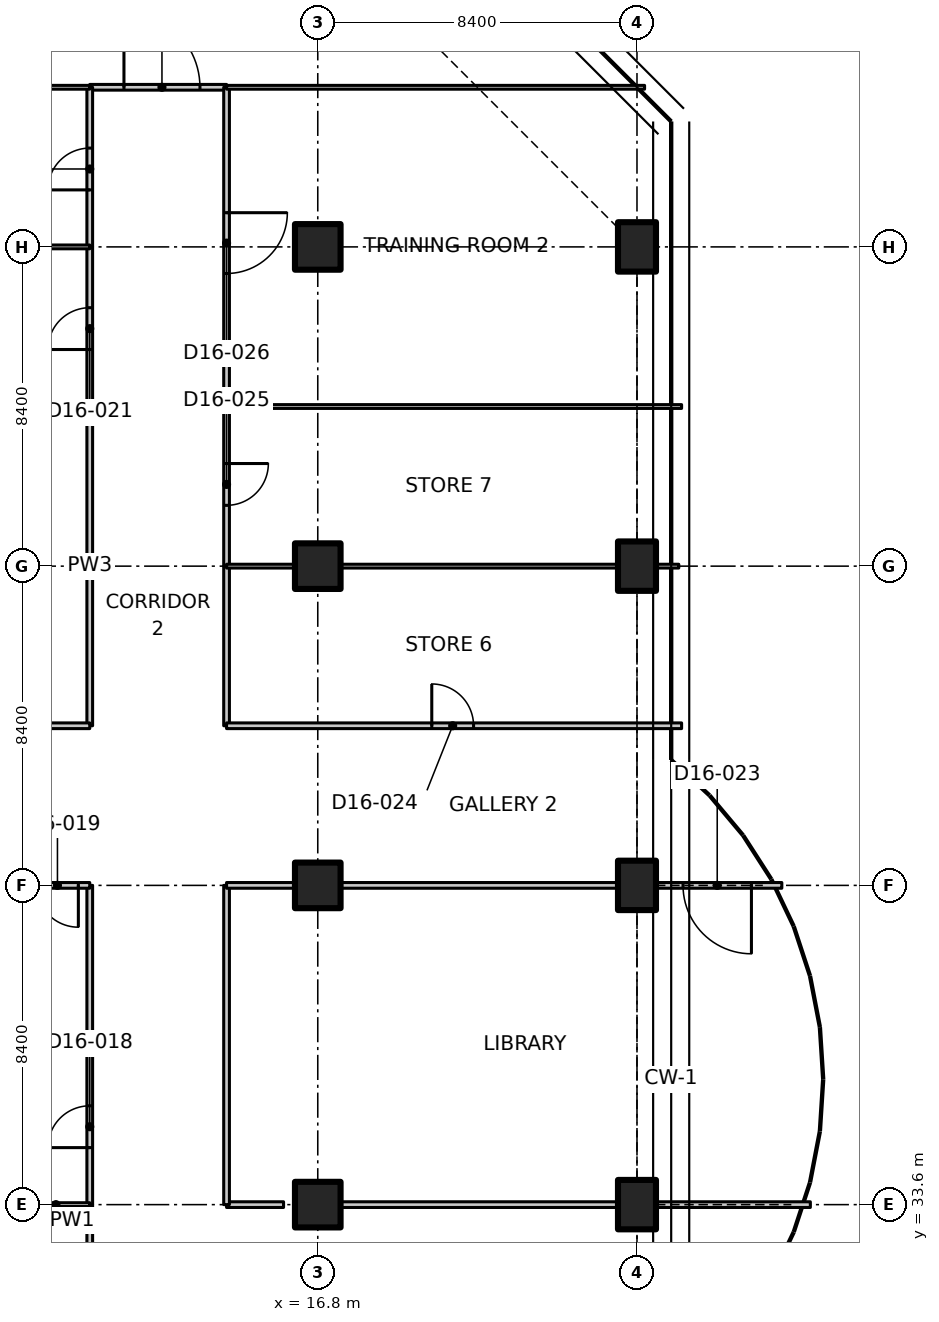
"""IFC4 building model, lengths in metres.
Left out: names, types, materials, properties, quantities, classifications, styles, units other than length and angle.
Written with IfcOpenShell. Run it as: python <this file> out.ifc"""

import sys

from ifc_helpers import new_model, si_unit, direction, frame, frame_2d, origin, origin_2d, place, context, subcontext, project, spatial, polyline, rectangle, outline, extrude, element, fill, save


model = new_model("IFC4")
c1 = context("Model", 3, precision=1e-05, world=origin(), true_north=direction((0.0, 1.0)))
c2 = subcontext(c1, "Body", "Model", "MODEL_VIEW")
j1 = project(units=[si_unit("LENGTHUNIT", "METRE"), si_unit("PLANEANGLEUNIT", "RADIAN")], contexts=[c1])
p1 = place(None, origin())
s1 = spatial("IfcSite", under=j1, at=p1, CompositionType="ELEMENT")
p2 = place(p1, origin())
s2 = spatial("IfcBuilding", under=s1, at=p2, CompositionType="ELEMENT")
p3 = place(p2, frame((0.0, 0.0, 124.1)))
s3 = spatial("IfcBuildingStorey", under=s2, at=p3, CompositionType="ELEMENT", Elevation=124.1)
for number, where, z_axis, x_axis in (
    (1, (16.8, 33.6, 0.0), (0.0, 0.0, 1.0), (1.0, 0.0, 0.0)),
    (2, (16.8, 42.0, 0.0), (0.0, 0.0, 1.0), (1.0, 0.0, 0.0)),
    (3, (16.8, 50.4, 0.0), (0.0, 0.0, 1.0), (1.0, 0.0, 0.0)),
    (4, (16.8, 58.8, 0.0), (0.0, 0.0, 1.0), (1.0, 0.0, 0.0)),
):
    element("IfcColumn", number, at=place(p3, frame(where, z_axis=z_axis, x_axis=x_axis)), inside=s3, PredefinedType="COLUMN", context=c2, shape_type="SweptSolid", body=[
        extrude(rectangle(XDim=1.2, YDim=1.2, at=origin_2d()), origin(), (0.0, 0.0, 1.0), 3.35),
    ])
for number, where, z_axis, x_axis in (
    (5, (25.2, 33.6, 0.0), (0.0, 0.0, 1.0), (1.0, 0.0, 0.0)),
    (6, (25.2, 42.0, 0.0), (0.0, 0.0, 1.0), (1.0, 0.0, 0.0)),
    (7, (25.2, 50.4, 0.0), (0.0, 0.0, 1.0), (1.0, 0.0, 0.0)),
    (8, (25.2, 58.8, 0.0), (0.0, 0.0, 1.0), (1.0, 0.0, 0.0)),
):
    element("IfcColumn", number, at=place(p3, frame(where, z_axis=z_axis, x_axis=x_axis)), inside=s3, PredefinedType="COLUMN", context=c2, shape_type="SweptSolid", body=[
        extrude(rectangle(XDim=1.0, YDim=1.3, at=origin_2d()), origin(), (0.0, 0.0, 1.0), 3.35),
    ])
p4 = place(p3, frame((10.8, 25.2, 0.0), z_axis=(0.0, 0.0, 1.0), x_axis=(0.0, 1.0, 0.0)))
e9 = element("IfcWall", 9, at=p4, inside=s3, PredefinedType="PARTITIONING", context=c2, shape_type="SweptSolid", body=[
    extrude(rectangle(XDim=8.4, YDim=0.15, at=frame_2d((4.2, 0.0))), origin(), (0.0, 0.0, 1.0), 3.33),
])
p5 = place(p4, frame((3.3, 0.0, 0.0)))
e10 = element("IfcOpeningElement", 10, at=p5, cuts=e9, PredefinedType="OPENING", context=c2, shape_type="SweptSolid", body=[
    extrude(rectangle(XDim=1.6, YDim=2.1, at=frame_2d((0.8, 1.05))), frame((0.0, 0.085, 0.0), z_axis=(0.0, -1.0, 0.0), x_axis=(1.0, 0.0, 0.0)), (0.0, 0.0, 1.0), 0.17),
])
p6 = place(p3, frame((14.4, 33.6, 0.0), z_axis=(0.0, 0.0, 1.0), x_axis=(1.0, 0.0, 0.0)))
e11 = element("IfcWall", 11, at=p6, inside=s3, PredefinedType="PARTITIONING", context=c2, shape_type="SweptSolid", body=[
    extrude(rectangle(XDim=1.5, YDim=0.15, at=frame_2d((0.75, 0.0))), origin(), (0.0, 0.0, 1.0), 3.33),
])
p7 = place(p3, frame((17.42, 33.6, 0.0), z_axis=(0.0, 0.0, 1.0), x_axis=(1.0, 0.0, 0.0)))
e12 = element("IfcWall", 12, at=p7, inside=s3, PredefinedType="PARTITIONING", context=c2, shape_type="SweptSolid", body=[
    extrude(rectangle(XDim=7.26, YDim=0.15, at=frame_2d((3.63, 0.0))), origin(), (0.0, 0.0, 1.0), 3.33),
])
p8 = place(p3, frame((25.72, 33.6, 0.0), z_axis=(0.0, 0.0, 1.0), x_axis=(1.0, 0.0, 0.0)))
e13 = element("IfcWall", 13, at=p8, inside=s3, PredefinedType="PARTITIONING", context=c2, shape_type="SweptSolid", body=[
    extrude(rectangle(XDim=4.042, YDim=0.15, at=frame_2d((2.021, 0.0))), origin(), (0.0, 0.0, 1.0), 2.98),
])
p9 = place(p3, frame((10.8, 63.0, 0.0), z_axis=(0.0, 0.0, 1.0), x_axis=(1.0, 0.0, 0.0)))
e14 = element("IfcWall", 14, at=p9, inside=s3, PredefinedType="PARTITIONING", context=c2, shape_type="SweptSolid", body=[
    extrude(rectangle(XDim=3.6, YDim=0.15, at=frame_2d((1.8, 0.0))), origin(), (0.0, 0.0, 1.0), 3.33),
])
p10 = place(p9, frame((0.9, 0.0, 0.0)))
e15 = element("IfcOpeningElement", 15, at=p10, cuts=e14, PredefinedType="OPENING", context=c2, shape_type="SweptSolid", body=[
    extrude(rectangle(XDim=2.0, YDim=2.4, at=frame_2d((1.0, 1.2))), frame((0.0, 0.085, 0.0), z_axis=(0.0, -1.0, 0.0), x_axis=(1.0, 0.0, 0.0)), (0.0, 0.0, 1.0), 0.17),
])
p11 = place(p3, frame((10.8, 33.6, 0.0), z_axis=(0.0, 0.0, 1.0), x_axis=(0.0, 1.0, 0.0)))
e16 = element("IfcWall", 16, at=p11, inside=s3, PredefinedType="PARTITIONING", context=c2, shape_type="SweptSolid", body=[
    extrude(rectangle(XDim=4.2, YDim=0.15, at=frame_2d((2.1, 0.0))), origin(), (0.0, 0.0, 1.0), 3.33),
])
p12 = place(p11, frame((1.5, 0.0, 0.0)))
e17 = element("IfcOpeningElement", 17, at=p12, cuts=e16, PredefinedType="OPENING", context=c2, shape_type="SweptSolid", body=[
    extrude(rectangle(XDim=1.1, YDim=2.1, at=frame_2d((0.55, 1.05))), frame((0.0, 0.085, 0.0), z_axis=(0.0, -1.0, 0.0), x_axis=(1.0, 0.0, 0.0)), (0.0, 0.0, 1.0), 0.17),
])
p13 = place(p3, frame((10.8, 37.8, 0.0), z_axis=(0.0, 0.0, 1.0), x_axis=(0.0, 1.0, 0.0)))
e18 = element("IfcWall", 18, at=p13, inside=s3, PredefinedType="PARTITIONING", context=c2, shape_type="SweptSolid", body=[
    extrude(rectangle(XDim=4.2, YDim=0.15, at=frame_2d((2.1, 0.0))), origin(), (0.0, 0.0, 1.0), 3.33),
])
p14 = place(p3, frame((10.8, 46.2, 0.0), z_axis=(0.0, 0.0, 1.0), x_axis=(0.0, 1.0, 0.0)))
e19 = element("IfcWall", 19, at=p14, inside=s3, PredefinedType="PARTITIONING", context=c2, shape_type="SweptSolid", body=[
    extrude(rectangle(XDim=8.4, YDim=0.15, at=frame_2d((4.2, 0.0))), origin(), (0.0, 0.0, 1.0), 3.33),
])
p15 = place(p3, frame((10.8, 54.6, 0.0), z_axis=(0.0, 0.0, 1.0), x_axis=(0.0, 1.0, 0.0)))
e20 = element("IfcWall", 20, at=p15, inside=s3, PredefinedType="PARTITIONING", context=c2, shape_type="SweptSolid", body=[
    extrude(rectangle(XDim=4.2, YDim=0.15, at=frame_2d((2.1, 0.0))), origin(), (0.0, 0.0, 1.0), 3.33),
])
p16 = place(p15, frame((1.5, 0.0, 0.0)))
e21 = element("IfcOpeningElement", 21, at=p16, cuts=e20, PredefinedType="OPENING", context=c2, shape_type="SweptSolid", body=[
    extrude(rectangle(XDim=1.1, YDim=2.1, at=frame_2d((0.55, 1.05))), frame((0.0, 0.085, 0.0), z_axis=(0.0, -1.0, 0.0), x_axis=(1.0, 0.0, 0.0)), (0.0, 0.0, 1.0), 0.17),
])
p17 = place(p3, frame((10.8, 58.8, 0.0), z_axis=(0.0, 0.0, 1.0), x_axis=(0.0, 1.0, 0.0)))
e22 = element("IfcWall", 22, at=p17, inside=s3, PredefinedType="PARTITIONING", context=c2, shape_type="SweptSolid", body=[
    extrude(rectangle(XDim=4.2, YDim=0.15, at=frame_2d((2.1, 0.0))), origin(), (0.0, 0.0, 1.0), 3.33),
])
p18 = place(p17, frame((1.5, 0.0, 0.0)))
e23 = element("IfcOpeningElement", 23, at=p18, cuts=e22, PredefinedType="OPENING", context=c2, shape_type="SweptSolid", body=[
    extrude(rectangle(XDim=1.1, YDim=2.1, at=frame_2d((0.55, 1.05))), frame((0.0, 0.085, 0.0), z_axis=(0.0, -1.0, 0.0), x_axis=(1.0, 0.0, 0.0)), (0.0, 0.0, 1.0), 0.17),
])
p19 = place(p3, frame((14.4, 42.0, 0.0), z_axis=(0.0, 0.0, 1.0), x_axis=(0.0, -1.0, 0.0)))
e24 = element("IfcWall", 24, at=p19, inside=s3, PredefinedType="PARTITIONING", context=c2, shape_type="SweptSolid", body=[
    extrude(rectangle(XDim=8.4, YDim=0.15, at=frame_2d((4.2, 0.0))), origin(), (0.0, 0.0, 1.0), 3.33),
])
p20 = place(p3, frame((14.4, 50.4, 0.0), z_axis=(0.0, 0.0, 1.0), x_axis=(0.0, -1.0, 0.0)))
e25 = element("IfcWall", 25, at=p20, inside=s3, PredefinedType="PARTITIONING", context=c2, shape_type="SweptSolid", body=[
    extrude(rectangle(XDim=4.2, YDim=0.15, at=frame_2d((2.1, 0.0))), origin(), (0.0, 0.0, 1.0), 3.33),
])
p21 = place(p3, frame((14.4, 54.6, 0.0), z_axis=(0.0, 0.0, 1.0), x_axis=(0.0, -1.0, 0.0)))
e26 = element("IfcWall", 26, at=p21, inside=s3, PredefinedType="PARTITIONING", context=c2, shape_type="SweptSolid", body=[
    extrude(rectangle(XDim=4.2, YDim=0.15, at=frame_2d((2.1, 0.0))), origin(), (0.0, 0.0, 1.0), 3.33),
])
p22 = place(p21, frame((1.5, 0.0, 0.0)))
e27 = element("IfcOpeningElement", 27, at=p22, cuts=e26, PredefinedType="OPENING", context=c2, shape_type="SweptSolid", body=[
    extrude(rectangle(XDim=1.1, YDim=2.1, at=frame_2d((0.55, 1.05))), frame((0.0, 0.085, 0.0), z_axis=(0.0, -1.0, 0.0), x_axis=(1.0, 0.0, 0.0)), (0.0, 0.0, 1.0), 0.17),
])
p23 = place(p3, frame((14.4, 63.0, 0.0), z_axis=(0.0, 0.0, 1.0), x_axis=(0.0, -1.0, 0.0)))
e28 = element("IfcWall", 28, at=p23, inside=s3, PredefinedType="PARTITIONING", context=c2, shape_type="SweptSolid", body=[
    extrude(rectangle(XDim=8.4, YDim=0.15, at=frame_2d((4.2, 0.0))), origin(), (0.0, 0.0, 1.0), 3.33),
])
p24 = place(p23, frame((3.3, 0.0, 0.0)))
e29 = element("IfcOpeningElement", 29, at=p24, cuts=e28, PredefinedType="OPENING", context=c2, shape_type="SweptSolid", body=[
    extrude(rectangle(XDim=1.6, YDim=2.1, at=frame_2d((0.8, 1.05))), frame((0.0, 0.085, 0.0), z_axis=(0.0, -1.0, 0.0), x_axis=(1.0, 0.0, 0.0)), (0.0, 0.0, 1.0), 0.17),
])
p25 = place(p3, frame((10.8, 63.0, 0.0), z_axis=(0.0, 0.0, 1.0), x_axis=(-1.0, 0.0, 0.0)))
e30 = element("IfcWall", 30, at=p25, inside=s3, PredefinedType="PARTITIONING", context=c2, shape_type="SweptSolid", body=[
    extrude(outline(polyline([(0.0, 0.0), (11.0, 0.0), (11.0, 3.33), (7.266, 3.33), (7.264, 2.98), (5.936, 2.98), (5.934, 3.33), (0.0, 3.33), (0.0, 0.0)])), frame((0.0, 0.05, 0.0), z_axis=(0.0, -1.0, 0.0), x_axis=(1.0, 0.0, 0.0)), (0.0, 0.0, 1.0), 0.1),
])
p26 = place(p3, frame((25.4, 63.0, 0.0), z_axis=(0.0, 0.0, 1.0), x_axis=(-1.0, 0.0, 0.0)))
e31 = element("IfcWall", 31, at=p26, inside=s3, PredefinedType="PARTITIONING", context=c2, shape_type="SweptSolid", body=[
    extrude(outline(polyline([(0.0, 0.0), (11.0, 0.0), (11.0, 3.33), (5.066, 3.33), (5.064, 2.98), (3.736, 2.98), (3.734, 3.33), (0.0, 3.33), (0.0, 0.0)])), frame((0.0, 0.05, 0.0), z_axis=(0.0, -1.0, 0.0), x_axis=(1.0, 0.0, 0.0)), (0.0, 0.0, 1.0), 0.1),
])
p27 = place(p3, frame((10.8, 42.0, 0.0), z_axis=(0.0, 0.0, 1.0), x_axis=(-1.0, 0.0, 0.0)))
e32 = element("IfcWall", 32, at=p27, inside=s3, PredefinedType="PARTITIONING", context=c2, shape_type="SweptSolid", body=[
    extrude(rectangle(XDim=1.78, YDim=0.15, at=frame_2d((0.89, 0.0))), origin(), (0.0, 0.0, 1.0), 3.33),
])
p28 = place(p27, frame((0.3, 0.0, 0.0)))
e33 = element("IfcOpeningElement", 33, at=p28, cuts=e32, PredefinedType="OPENING", context=c2, shape_type="SweptSolid", body=[
    extrude(rectangle(XDim=1.1, YDim=2.1, at=frame_2d((0.55, 1.05))), frame((0.0, 0.085, 0.0), z_axis=(0.0, -1.0, 0.0), x_axis=(1.0, 0.0, 0.0)), (0.0, 0.0, 1.0), 0.17),
])
p29 = place(p3, frame((-1.174, 46.2, 0.0), z_axis=(0.0, 0.0, 1.0), x_axis=(1.0, 0.0, 0.0)))
e34 = element("IfcWall", 34, at=p29, inside=s3, PredefinedType="PARTITIONING", context=c2, shape_type="SweptSolid", body=[
    extrude(outline(polyline([(0.0, 0.0), (11.974, 0.0), (11.974, 3.33), (1.624, 3.33), (1.622, 2.98), (0.726, 2.98), (0.724, 3.33), (0.074, 3.33), (0.0, 3.33), (0.0, 0.0)])), frame((0.0, 0.075, 0.0), z_axis=(0.0, -1.0, 0.0), x_axis=(1.0, 0.0, 0.0)), (0.0, 0.0, 1.0), 0.15),
])
p30 = place(p29, frame((5.374, 0.0, 0.0)))
e35 = element("IfcOpeningElement", 35, at=p30, cuts=e34, PredefinedType="OPENING", context=c2, shape_type="SweptSolid", body=[
    extrude(rectangle(XDim=1.6, YDim=2.1, at=frame_2d((0.8, 1.05))), frame((0.0, 0.085, 0.0), z_axis=(0.0, -1.0, 0.0), x_axis=(1.0, 0.0, 0.0)), (0.0, 0.0, 1.0), 0.17),
])
p31 = place(p3, frame((9.02, 33.6, 0.0), z_axis=(0.0, 0.0, 1.0), x_axis=(1.0, 0.0, 0.0)))
e36 = element("IfcWall", 36, at=p31, inside=s3, PredefinedType="PARTITIONING", context=c2, shape_type="SweptSolid", body=[
    extrude(rectangle(XDim=1.78, YDim=0.1, at=frame_2d((0.89, 0.0))), origin(), (0.0, 0.0, 1.0), 3.33),
])
for number, where, z_axis, x_axis in (
    (37, (-1.174, 37.8, 0.0), (0.0, 0.0, 1.0), (1.0, 0.0, 0.0)),
    (38, (-1.174, 54.6, 0.0), (0.0, 0.0, 1.0), (1.0, 0.0, 0.0)),
):
    element("IfcWall", number, at=place(p3, frame(where, z_axis=z_axis, x_axis=x_axis)), inside=s3, PredefinedType="PARTITIONING", context=c2, shape_type="SweptSolid", body=[
        extrude(outline(polyline([(0.0, 0.0), (11.974, 0.0), (11.974, 3.33), (1.624, 3.33), (1.622, 2.98), (0.726, 2.98), (0.724, 3.33), (0.074, 3.33), (0.0, 3.33), (0.0, 0.0)])), frame((0.0, 0.05, 0.0), z_axis=(0.0, -1.0, 0.0), x_axis=(1.0, 0.0, 0.0)), (0.0, 0.0, 1.0), 0.1),
    ])
p32 = place(p3, frame((9.02, 58.8, 0.0), z_axis=(0.0, 0.0, 1.0), x_axis=(1.0, 0.0, 0.0)))
e39 = element("IfcWall", 39, at=p32, inside=s3, PredefinedType="PARTITIONING", context=c2, shape_type="SweptSolid", body=[
    extrude(rectangle(XDim=1.78, YDim=0.1, at=frame_2d((0.89, 0.0))), origin(), (0.0, 0.0, 1.0), 3.33),
])
p33 = place(p3, frame((29.011, 42.0, 0.0), z_axis=(0.0, 0.0, 1.0), x_axis=(-1.0, 0.0, 0.0)))
e40 = element("IfcWall", 40, at=p33, inside=s3, PredefinedType="PARTITIONING", context=c2, shape_type="SweptSolid", body=[
    extrude(rectangle(XDim=3.292, YDim=0.15, at=frame_2d((1.646, 0.0))), origin(), (0.0, 0.0, 1.0), 2.98),
])
p34 = place(p33, frame((0.8, 0.0, 0.0)))
e41 = element("IfcOpeningElement", 41, at=p34, cuts=e40, PredefinedType="OPENING", context=c2, shape_type="SweptSolid", body=[
    extrude(rectangle(XDim=1.8, YDim=2.1, at=frame_2d((0.9, 1.05))), frame((0.0, 0.085, 0.0), z_axis=(0.0, -1.0, 0.0), x_axis=(1.0, 0.0, 0.0)), (0.0, 0.0, 1.0), 0.17),
])
p35 = place(p3, frame((24.68, 42.0, 0.0), z_axis=(0.0, 0.0, 1.0), x_axis=(-1.0, 0.0, 0.0)))
e42 = element("IfcWall", 42, at=p35, inside=s3, PredefinedType="PARTITIONING", context=c2, shape_type="SweptSolid", body=[
    extrude(rectangle(XDim=7.26, YDim=0.15, at=frame_2d((3.63, 0.0))), origin(), (0.0, 0.0, 1.0), 3.33),
])
p36 = place(p3, frame((16.18, 42.0, 0.0), z_axis=(0.0, 0.0, 1.0), x_axis=(-1.0, 0.0, 0.0)))
e43 = element("IfcWall", 43, at=p36, inside=s3, PredefinedType="PARTITIONING", context=c2, shape_type="SweptSolid", body=[
    extrude(rectangle(XDim=1.78, YDim=0.15, at=frame_2d((0.89, 0.0))), origin(), (0.0, 0.0, 1.0), 3.33),
])
p37 = place(p3, frame((14.4, 46.2, 0.0), z_axis=(0.0, 0.0, 1.0), x_axis=(1.0, 0.0, 0.0)))
e44 = element("IfcWall", 44, at=p37, inside=s3, PredefinedType="PARTITIONING", context=c2, shape_type="SweptSolid", body=[
    extrude(outline(polyline([(0.0, 0.0), (11.974, 0.0), (11.974, 3.33), (11.9, 3.33), (11.25, 3.33), (11.248, 2.98), (10.352, 2.98), (10.35, 3.33), (0.0, 3.33), (0.0, 0.0)])), frame((0.0, 0.075, 0.0), z_axis=(0.0, -1.0, 0.0), x_axis=(1.0, 0.0, 0.0)), (0.0, 0.0, 1.0), 0.15),
])
p38 = place(p37, frame((5.4, 0.0, 0.0)))
e45 = element("IfcOpeningElement", 45, at=p38, cuts=e44, PredefinedType="OPENING", context=c2, shape_type="SweptSolid", body=[
    extrude(rectangle(XDim=1.1, YDim=2.1, at=frame_2d((0.55, 1.05))), frame((0.0, 0.085, 0.0), z_axis=(0.0, -1.0, 0.0), x_axis=(1.0, 0.0, 0.0)), (0.0, 0.0, 1.0), 0.17),
])
p39 = place(p3, frame((14.4, 50.4, 0.0), z_axis=(0.0, 0.0, 1.0), x_axis=(1.0, 0.0, 0.0)))
e46 = element("IfcWall", 46, at=p39, inside=s3, PredefinedType="PARTITIONING", context=c2, shape_type="SweptSolid", body=[
    extrude(rectangle(XDim=1.78, YDim=0.1, at=frame_2d((0.89, 0.0))), origin(), (0.0, 0.0, 1.0), 3.33),
])
p40 = place(p3, frame((17.42, 50.4, 0.0), z_axis=(0.0, 0.0, 1.0), x_axis=(1.0, 0.0, 0.0)))
e47 = element("IfcWall", 47, at=p40, inside=s3, PredefinedType="PARTITIONING", context=c2, shape_type="SweptSolid", body=[
    extrude(rectangle(XDim=7.26, YDim=0.1, at=frame_2d((3.63, 0.0))), origin(), (0.0, 0.0, 1.0), 3.33),
])
p41 = place(p3, frame((25.72, 50.4, 0.0), z_axis=(0.0, 0.0, 1.0), x_axis=(1.0, 0.0, 0.0)))
e48 = element("IfcWall", 48, at=p41, inside=s3, PredefinedType="PARTITIONING", context=c2, shape_type="SweptSolid", body=[
    extrude(rectangle(XDim=0.58, YDim=0.1, at=frame_2d((0.29, 0.0))), origin(), (0.0, 0.0, 1.0), 3.33),
])
p42 = place(p3, frame((14.4, 54.6, 0.0), z_axis=(0.0, 0.0, 1.0), x_axis=(1.0, 0.0, 0.0)))
e49 = element("IfcWall", 49, at=p42, inside=s3, PredefinedType="PARTITIONING", context=c2, shape_type="SweptSolid", body=[
    extrude(outline(polyline([(0.0, 0.0), (11.974, 0.0), (11.974, 3.33), (11.9, 3.33), (11.25, 3.33), (11.248, 2.98), (10.352, 2.98), (10.35, 3.33), (0.0, 3.33), (0.0, 0.0)])), frame((0.0, 0.05, 0.0), z_axis=(0.0, -1.0, 0.0), x_axis=(1.0, 0.0, 0.0)), (0.0, 0.0, 1.0), 0.1),
])
p43 = place(p10, origin())
e50 = element("IfcDoor", 50, at=p43, inside=s3, OperationType="DOUBLE_DOOR_SINGLE_SWING", PredefinedType="DOOR", context=c2, shape_type="SweptSolid", body=[
    extrude(rectangle(XDim=2.0, YDim=2.4, at=frame_2d((1.0, 1.2))), frame((0.0, 0.025, 0.0), z_axis=(0.0, -1.0, 0.0), x_axis=(1.0, 0.0, 0.0)), (0.0, 0.0, 1.0), 0.05),
])
fill(e15, e50)
p44 = place(p12, origin())
e51 = element("IfcDoor", 51, at=p44, inside=s3, OperationType="SINGLE_SWING_LEFT", PredefinedType="DOOR", context=c2, shape_type="SweptSolid", body=[
    extrude(rectangle(XDim=1.1, YDim=2.1, at=frame_2d((0.55, 1.05))), frame((0.0, 0.025, 0.0), z_axis=(0.0, -1.0, 0.0), x_axis=(1.0, 0.0, 0.0)), (0.0, 0.0, 1.0), 0.05),
])
fill(e17, e51)
p45 = place(p28, origin())
e52 = element("IfcDoor", 52, at=p45, inside=s3, OperationType="SINGLE_SWING_LEFT", PredefinedType="DOOR", context=c2, shape_type="SweptSolid", body=[
    extrude(rectangle(XDim=1.1, YDim=2.1, at=frame_2d((0.55, 1.05))), frame((0.0, 0.025, 0.0), z_axis=(0.0, -1.0, 0.0), x_axis=(1.0, 0.0, 0.0)), (0.0, 0.0, 1.0), 0.05),
])
fill(e33, e52)
p46 = place(p16, origin())
e53 = element("IfcDoor", 53, at=p46, inside=s3, OperationType="SINGLE_SWING_LEFT", PredefinedType="DOOR", context=c2, shape_type="SweptSolid", body=[
    extrude(rectangle(XDim=1.1, YDim=2.1, at=frame_2d((0.55, 1.05))), frame((0.0, 0.025, 0.0), z_axis=(0.0, -1.0, 0.0), x_axis=(1.0, 0.0, 0.0)), (0.0, 0.0, 1.0), 0.05),
])
fill(e21, e53)
p47 = place(p18, origin())
e54 = element("IfcDoor", 54, at=p47, inside=s3, OperationType="SINGLE_SWING_LEFT", PredefinedType="DOOR", context=c2, shape_type="SweptSolid", body=[
    extrude(rectangle(XDim=1.1, YDim=2.1, at=frame_2d((0.55, 1.05))), frame((0.0, 0.025, 0.0), z_axis=(0.0, -1.0, 0.0), x_axis=(1.0, 0.0, 0.0)), (0.0, 0.0, 1.0), 0.05),
])
fill(e23, e54)
p48 = place(p34, origin())
e55 = element("IfcDoor", 55, at=p48, inside=s3, OperationType="DOUBLE_DOOR_SINGLE_SWING", PredefinedType="DOOR", context=c2, shape_type="SweptSolid", body=[
    extrude(rectangle(XDim=1.8, YDim=2.1, at=frame_2d((0.9, 1.05))), frame((0.0, 0.025, 0.0), z_axis=(0.0, -1.0, 0.0), x_axis=(1.0, 0.0, 0.0)), (0.0, 0.0, 1.0), 0.05),
])
fill(e41, e55)
p49 = place(p38, origin())
e56 = element("IfcDoor", 56, at=p49, inside=s3, OperationType="SINGLE_SWING_LEFT", PredefinedType="DOOR", context=c2, shape_type="SweptSolid", body=[
    extrude(rectangle(XDim=1.1, YDim=2.1, at=frame_2d((0.55, 1.05))), frame((0.0, 0.025, 0.0), z_axis=(0.0, -1.0, 0.0), x_axis=(1.0, 0.0, 0.0)), (0.0, 0.0, 1.0), 0.05),
])
fill(e45, e56)
p50 = place(p22, origin())
e57 = element("IfcDoor", 57, at=p50, inside=s3, OperationType="SINGLE_SWING_LEFT", PredefinedType="DOOR", context=c2, shape_type="SweptSolid", body=[
    extrude(rectangle(XDim=1.1, YDim=2.1, at=frame_2d((0.55, 1.05))), frame((0.0, 0.025, 0.0), z_axis=(0.0, -1.0, 0.0), x_axis=(1.0, 0.0, 0.0)), (0.0, 0.0, 1.0), 0.05),
])
fill(e27, e57)
p51 = place(p24, origin())
e58 = element("IfcDoor", 58, at=p51, inside=s3, OperationType="DOUBLE_DOOR_SINGLE_SWING", PredefinedType="DOOR", context=c2, shape_type="SweptSolid", body=[
    extrude(rectangle(XDim=1.6, YDim=2.1, at=frame_2d((0.8, 1.05))), frame((0.0, 0.025, 0.0), z_axis=(0.0, -1.0, 0.0), x_axis=(1.0, 0.0, 0.0)), (0.0, 0.0, 1.0), 0.05),
])
fill(e29, e58)
save(model, sys.argv[1])
